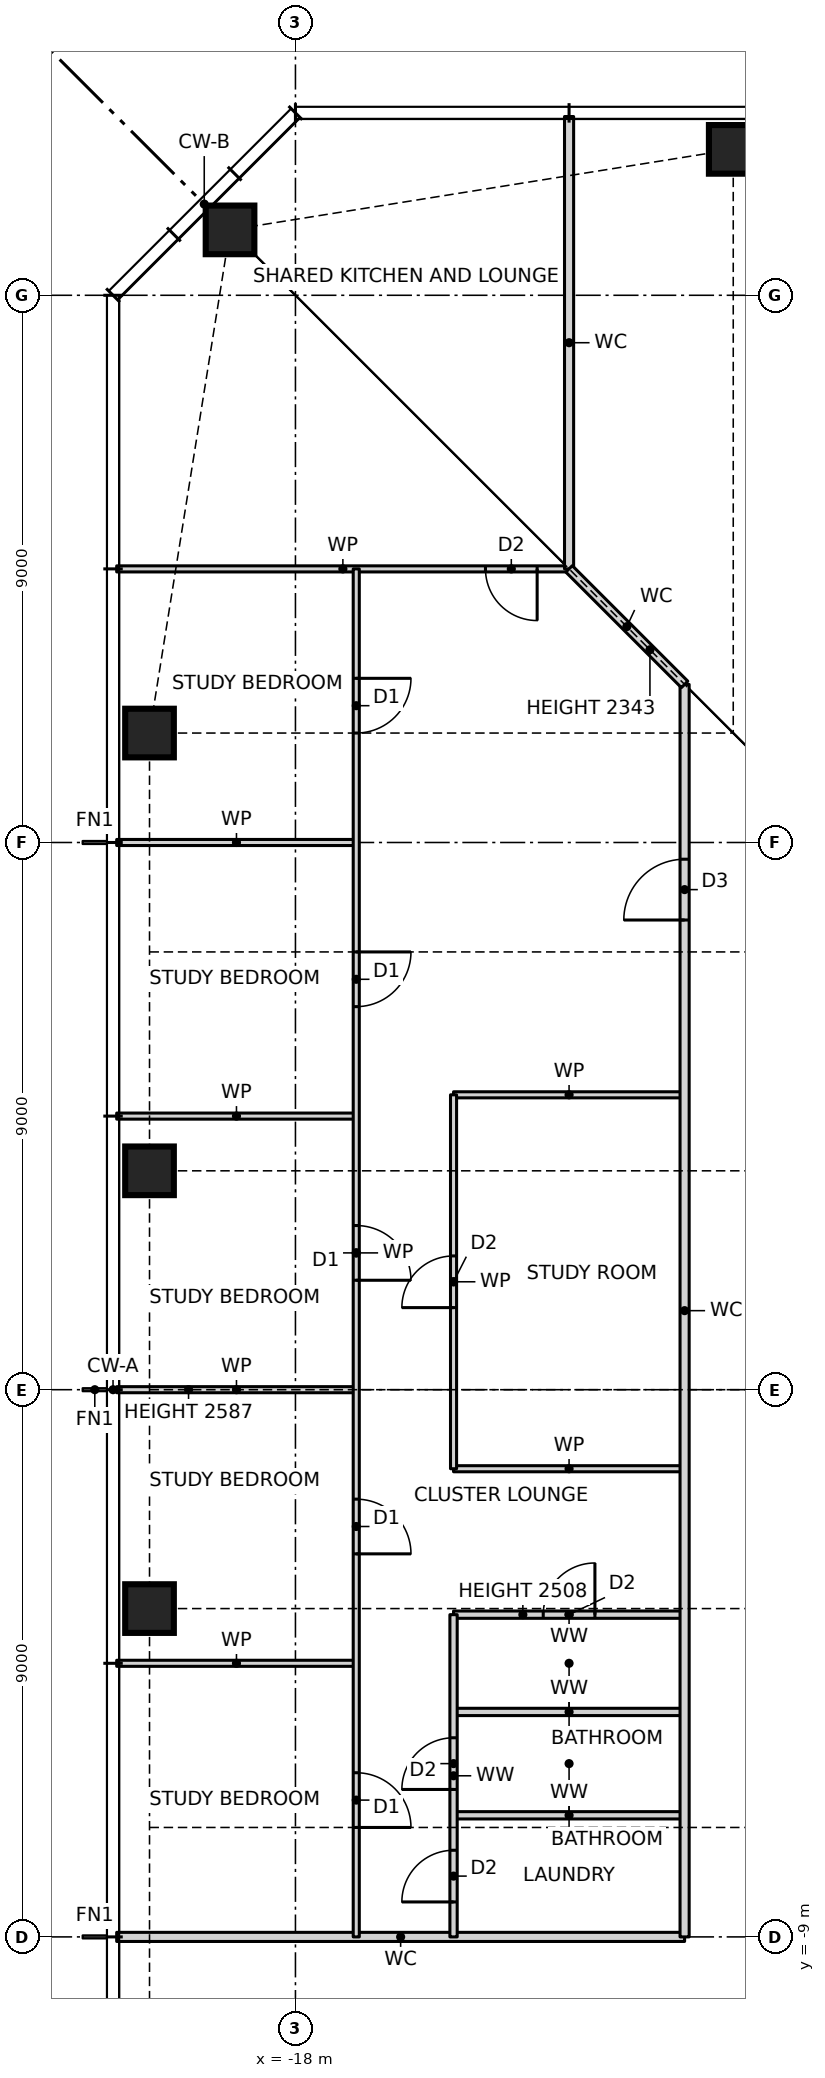
"""IFC4 building model, lengths in metres.
Left out: names, types, materials, properties, quantities, classifications, styles, units other than length and angle.
Written with IfcOpenShell. Run it as: python <this file> out.ifc"""

import sys

from ifc_helpers import new_model, si_unit, direction, frame, frame_2d, origin, origin_2d, place, context, subcontext, project, spatial, rectangle, hollow_rectangle, extrude, element, fill, save


model = new_model("IFC4")
c1 = context("Model", 3, precision=1e-05, world=origin(), true_north=direction((0.0, 1.0)))
c2 = subcontext(c1, "Body", "Model", "MODEL_VIEW")
j1 = project(units=[si_unit("LENGTHUNIT", "METRE"), si_unit("PLANEANGLEUNIT", "RADIAN")], contexts=[c1])
p1 = place(None, origin())
s1 = spatial("IfcSite", under=j1, at=p1, CompositionType="ELEMENT")
p2 = place(p1, origin())
s2 = spatial("IfcBuilding", under=s1, at=p2, CompositionType="ELEMENT")
p3 = place(p2, frame((0.0, 0.0, 98.0)))
s3 = spatial("IfcBuildingStorey", under=s2, at=p3, CompositionType="ELEMENT", Elevation=98.0)
for number, where, z_axis, x_axis in (
    (1, (-10.8, 20.4, 0.0), (0.0, 0.0, 1.0), (1.0, 0.0, 0.0)),
    (2, (-19.076, 19.076, 0.0), (0.0, 0.0, 1.0), (1.0, 0.0, 0.0)),
    (3, (-20.4, 10.8, 0.0), (0.0, 0.0, 1.0), (1.0, 0.0, 0.0)),
    (4, (-20.4, 3.6, 0.0), (0.0, 0.0, 1.0), (1.0, 0.0, 0.0)),
    (5, (-20.4, -3.6, 0.0), (0.0, 0.0, 1.0), (1.0, 0.0, 0.0)),
):
    element("IfcColumn", number, at=place(p3, frame(where, z_axis=z_axis, x_axis=x_axis)), inside=s3, PredefinedType="COLUMN", context=c2, shape_type="SweptSolid", body=[
        extrude(hollow_rectangle(XDim=0.8, YDim=0.8, WallThickness=0.07, at=origin_2d()), origin(), (0.0, 0.0, 1.0), 3.5),
    ])
p4 = place(p3, frame((-20.94, -9.0, 0.0), z_axis=(0.0, 0.0, 1.0), x_axis=(1.0, 0.0, 0.0)))
e6 = element("IfcWall", 6, at=p4, inside=s3, PredefinedType="PARTITIONING", context=c2, shape_type="SweptSolid", body=[
    extrude(rectangle(XDim=9.34, YDim=0.15, at=frame_2d((4.67, 0.0))), origin(), (0.0, 0.0, 1.0), 3.27),
])
for number, where, z_axis, x_axis in (
    (7, (-15.4, -7.0, 0.0), (0.0, 0.0, 1.0), (1.0, 0.0, 0.0)),
    (8, (-15.4, -5.3, 0.0), (0.0, 0.0, 1.0), (1.0, 0.0, 0.0)),
):
    element("IfcWall", number, at=place(p3, frame(where, z_axis=z_axis, x_axis=x_axis)), inside=s3, PredefinedType="PARTITIONING", context=c2, shape_type="SweptSolid", body=[
        extrude(rectangle(XDim=3.8, YDim=0.12, at=frame_2d((1.9, 0.0))), origin(), (0.0, 0.0, 1.0), 3.27),
    ])
p5 = place(p3, frame((-20.94, -4.5, 0.0), z_axis=(0.0, 0.0, 1.0), x_axis=(1.0, 0.0, 0.0)))
e9 = element("IfcWall", 9, at=p5, inside=s3, PredefinedType="PARTITIONING", context=c2, shape_type="SweptSolid", body=[
    extrude(rectangle(XDim=3.94, YDim=0.1, at=frame_2d((1.97, 0.0))), origin(), (0.0, 0.0, 1.0), 3.27),
])
p6 = place(p3, frame((-15.4, -3.7, 0.0), z_axis=(0.0, 0.0, 1.0), x_axis=(1.0, 0.0, 0.0)))
e10 = element("IfcWall", 10, at=p6, inside=s3, PredefinedType="PARTITIONING", context=c2, shape_type="SweptSolid", body=[
    extrude(rectangle(XDim=3.8, YDim=0.12, at=frame_2d((1.9, 0.0))), origin(), (0.0, 0.0, 1.0), 2.508),
])
p7 = place(p6, frame((1.475, 0.0, 0.0)))
e11 = element("IfcOpeningElement", 11, at=p7, cuts=e10, PredefinedType="OPENING", context=c2, shape_type="SweptSolid", body=[
    extrude(rectangle(XDim=0.85, YDim=2.1, at=frame_2d((0.425, 1.05))), frame((0.0, 0.07, 0.0), z_axis=(0.0, -1.0, 0.0), x_axis=(1.0, 0.0, 0.0)), (0.0, 0.0, 1.0), 0.14),
])
p8 = place(p3, frame((-15.4, -1.3, 0.0), z_axis=(0.0, 0.0, 1.0), x_axis=(1.0, 0.0, 0.0)))
e12 = element("IfcWall", 12, at=p8, inside=s3, PredefinedType="PARTITIONING", context=c2, shape_type="SweptSolid", body=[
    extrude(rectangle(XDim=3.8, YDim=0.1, at=frame_2d((1.9, 0.0))), origin(), (0.0, 0.0, 1.0), 3.27),
])
p9 = place(p3, frame((-20.94, 0.0, 0.0), z_axis=(0.0, 0.0, 1.0), x_axis=(1.0, 0.0, 0.0)))
e13 = element("IfcWall", 13, at=p9, inside=s3, PredefinedType="PARTITIONING", context=c2, shape_type="SweptSolid", body=[
    extrude(rectangle(XDim=3.94, YDim=0.1, at=frame_2d((1.97, 0.0))), origin(), (0.0, 0.0, 1.0), 2.587),
])
p10 = place(p3, frame((-20.94, 4.5, 0.0), z_axis=(0.0, 0.0, 1.0), x_axis=(1.0, 0.0, 0.0)))
e14 = element("IfcWall", 14, at=p10, inside=s3, PredefinedType="PARTITIONING", context=c2, shape_type="SweptSolid", body=[
    extrude(rectangle(XDim=3.94, YDim=0.1, at=frame_2d((1.97, 0.0))), origin(), (0.0, 0.0, 1.0), 3.27),
])
p11 = place(p3, frame((-15.4, 4.85, 0.0), z_axis=(0.0, 0.0, 1.0), x_axis=(1.0, 0.0, 0.0)))
e15 = element("IfcWall", 15, at=p11, inside=s3, PredefinedType="PARTITIONING", context=c2, shape_type="SweptSolid", body=[
    extrude(rectangle(XDim=3.8, YDim=0.1, at=frame_2d((1.9, 0.0))), origin(), (0.0, 0.0, 1.0), 3.27),
])
p12 = place(p3, frame((-20.94, 9.0, 0.0), z_axis=(0.0, 0.0, 1.0), x_axis=(1.0, 0.0, 0.0)))
e16 = element("IfcWall", 16, at=p12, inside=s3, PredefinedType="PARTITIONING", context=c2, shape_type="SweptSolid", body=[
    extrude(rectangle(XDim=3.94, YDim=0.1, at=frame_2d((1.97, 0.0))), origin(), (0.0, 0.0, 1.0), 3.27),
])
p13 = place(p3, frame((-20.94, 13.5, 0.0), z_axis=(0.0, 0.0, 1.0), x_axis=(1.0, 0.0, 0.0)))
e17 = element("IfcWall", 17, at=p13, inside=s3, PredefinedType="PARTITIONING", context=c2, shape_type="SweptSolid", body=[
    extrude(rectangle(XDim=7.44, YDim=0.1, at=frame_2d((3.72, 0.0))), origin(), (0.0, 0.0, 1.0), 3.27),
])
p14 = place(p13, frame((6.065, 0.0, 0.0)))
e18 = element("IfcOpeningElement", 18, at=p14, cuts=e17, PredefinedType="OPENING", context=c2, shape_type="SweptSolid", body=[
    extrude(rectangle(XDim=0.85, YDim=2.1, at=frame_2d((0.425, 1.05))), frame((0.0, 0.06, 0.0), z_axis=(0.0, -1.0, 0.0), x_axis=(1.0, 0.0, 0.0)), (0.0, 0.0, 1.0), 0.12),
])
p15 = place(p3, frame((-11.6, -9.0, 0.0), z_axis=(0.0, 0.0, 1.0), x_axis=(0.0, 1.0, 0.0)))
e19 = element("IfcWall", 19, at=p15, inside=s3, PredefinedType="PARTITIONING", context=c2, shape_type="SweptSolid", body=[
    extrude(rectangle(XDim=20.6, YDim=0.15, at=frame_2d((10.3, 0.0))), origin(), (0.0, 0.0, 1.0), 3.27),
])
p16 = place(p15, frame((16.725, 0.0, 0.0)))
e20 = element("IfcOpeningElement", 20, at=p16, cuts=e19, PredefinedType="OPENING", context=c2, shape_type="SweptSolid", body=[
    extrude(rectangle(XDim=1.0, YDim=2.1, at=frame_2d((0.5, 1.05))), frame((0.0, 0.085, 0.0), z_axis=(0.0, -1.0, 0.0), x_axis=(1.0, 0.0, 0.0)), (0.0, 0.0, 1.0), 0.17),
])
p17 = place(p3, frame((-13.5, 13.5, 0.0), z_axis=(0.0, 0.0, 1.0), x_axis=(0.0, 1.0, 0.0)))
e21 = element("IfcWall", 21, at=p17, inside=s3, PredefinedType="PARTITIONING", context=c2, shape_type="SweptSolid", body=[
    extrude(rectangle(XDim=7.44, YDim=0.15, at=frame_2d((3.72, 0.0))), origin(), (0.0, 0.0, 1.0), 3.27),
])
p18 = place(p3, frame((-15.4, -9.0, 0.0), z_axis=(0.0, 0.0, 1.0), x_axis=(0.0, 1.0, 0.0)))
e22 = element("IfcWall", 22, at=p18, inside=s3, PredefinedType="PARTITIONING", context=c2, shape_type="SweptSolid", body=[
    extrude(rectangle(XDim=5.3, YDim=0.12, at=frame_2d((2.65, 0.0))), origin(), (0.0, 0.0, 1.0), 3.27),
])
p19 = place(p18, frame((2.425, 0.0, 0.0)))
e23 = element("IfcOpeningElement", 23, at=p19, cuts=e22, PredefinedType="OPENING", context=c2, shape_type="SweptSolid", body=[
    extrude(rectangle(XDim=0.85, YDim=2.1, at=frame_2d((0.425, 1.05))), frame((0.0, 0.07, 0.0), z_axis=(0.0, -1.0, 0.0), x_axis=(1.0, 0.0, 0.0)), (0.0, 0.0, 1.0), 0.14),
])
p20 = place(p18, frame((0.575, 0.0, 0.0)))
e24 = element("IfcOpeningElement", 24, at=p20, cuts=e22, PredefinedType="OPENING", context=c2, shape_type="SweptSolid", body=[
    extrude(rectangle(XDim=0.85, YDim=2.1, at=frame_2d((0.425, 1.05))), frame((0.0, 0.07, 0.0), z_axis=(0.0, -1.0, 0.0), x_axis=(1.0, 0.0, 0.0)), (0.0, 0.0, 1.0), 0.14),
])
p21 = place(p3, frame((-15.4, -1.3, 0.0), z_axis=(0.0, 0.0, 1.0), x_axis=(0.0, 1.0, 0.0)))
e25 = element("IfcWall", 25, at=p21, inside=s3, PredefinedType="PARTITIONING", context=c2, shape_type="SweptSolid", body=[
    extrude(rectangle(XDim=6.15, YDim=0.1, at=frame_2d((3.075, 0.0))), origin(), (0.0, 0.0, 1.0), 3.27),
])
p22 = place(p21, frame((2.65, 0.0, 0.0)))
e26 = element("IfcOpeningElement", 26, at=p22, cuts=e25, PredefinedType="OPENING", context=c2, shape_type="SweptSolid", body=[
    extrude(rectangle(XDim=0.85, YDim=2.1, at=frame_2d((0.425, 1.05))), frame((0.0, 0.06, 0.0), z_axis=(0.0, -1.0, 0.0), x_axis=(1.0, 0.0, 0.0)), (0.0, 0.0, 1.0), 0.12),
])
p23 = place(p3, frame((-17.0, -9.0, 0.0), z_axis=(0.0, 0.0, 1.0), x_axis=(0.0, 1.0, 0.0)))
e27 = element("IfcWall", 27, at=p23, inside=s3, PredefinedType="PARTITIONING", context=c2, shape_type="SweptSolid", body=[
    extrude(rectangle(XDim=22.5, YDim=0.1, at=frame_2d((11.25, 0.0))), origin(), (0.0, 0.0, 1.0), 3.27),
])
p24 = place(p23, frame((19.8, 0.0, 0.0)))
e28 = element("IfcOpeningElement", 28, at=p24, cuts=e27, PredefinedType="OPENING", context=c2, shape_type="SweptSolid", body=[
    extrude(rectangle(XDim=0.9, YDim=2.1, at=frame_2d((0.45, 1.05))), frame((0.0, 0.06, 0.0), z_axis=(0.0, -1.0, 0.0), x_axis=(1.0, 0.0, 0.0)), (0.0, 0.0, 1.0), 0.12),
])
p25 = place(p23, frame((15.3, 0.0, 0.0)))
e29 = element("IfcOpeningElement", 29, at=p25, cuts=e27, PredefinedType="OPENING", context=c2, shape_type="SweptSolid", body=[
    extrude(rectangle(XDim=0.9, YDim=2.1, at=frame_2d((0.45, 1.05))), frame((0.0, 0.06, 0.0), z_axis=(0.0, -1.0, 0.0), x_axis=(1.0, 0.0, 0.0)), (0.0, 0.0, 1.0), 0.12),
])
p26 = place(p23, frame((10.8, 0.0, 0.0)))
e30 = element("IfcOpeningElement", 30, at=p26, cuts=e27, PredefinedType="OPENING", context=c2, shape_type="SweptSolid", body=[
    extrude(rectangle(XDim=0.9, YDim=2.1, at=frame_2d((0.45, 1.05))), frame((0.0, 0.06, 0.0), z_axis=(0.0, -1.0, 0.0), x_axis=(1.0, 0.0, 0.0)), (0.0, 0.0, 1.0), 0.12),
])
p27 = place(p23, frame((6.3, 0.0, 0.0)))
e31 = element("IfcOpeningElement", 31, at=p27, cuts=e27, PredefinedType="OPENING", context=c2, shape_type="SweptSolid", body=[
    extrude(rectangle(XDim=0.9, YDim=2.1, at=frame_2d((0.45, 1.05))), frame((0.0, 0.06, 0.0), z_axis=(0.0, -1.0, 0.0), x_axis=(1.0, 0.0, 0.0)), (0.0, 0.0, 1.0), 0.12),
])
p28 = place(p23, frame((1.8, 0.0, 0.0)))
e32 = element("IfcOpeningElement", 32, at=p28, cuts=e27, PredefinedType="OPENING", context=c2, shape_type="SweptSolid", body=[
    extrude(rectangle(XDim=0.9, YDim=2.1, at=frame_2d((0.45, 1.05))), frame((0.0, 0.06, 0.0), z_axis=(0.0, -1.0, 0.0), x_axis=(1.0, 0.0, 0.0)), (0.0, 0.0, 1.0), 0.12),
])
p29 = place(p3, frame((-11.6, 11.6, 0.0), z_axis=(0.0, 0.0, 1.0), x_axis=(-0.707106781187, 0.707106781187, 0.0)))
e33 = element("IfcWall", 33, at=p29, inside=s3, PredefinedType="PARTITIONING", context=c2, shape_type="SweptSolid", body=[
    extrude(rectangle(XDim=2.687, YDim=0.15, at=frame_2d((1.343, 0.0))), origin(), (0.0, 0.0, 1.0), 2.343),
])
p30 = place(p24, frame((0.9, 0.0, 0.0), z_axis=(0.0, 0.0, 1.0), x_axis=(-1.0, 0.0, 0.0)))
e34 = element("IfcDoor", 34, at=p30, inside=s3, OperationType="SINGLE_SWING_LEFT", PredefinedType="DOOR", context=c2, shape_type="SweptSolid", body=[
    extrude(rectangle(XDim=0.9, YDim=2.1, at=frame_2d((0.45, 1.05))), frame((0.0, 0.025, 0.0), z_axis=(0.0, -1.0, 0.0), x_axis=(1.0, 0.0, 0.0)), (0.0, 0.0, 1.0), 0.05),
])
fill(e28, e34)
p31 = place(p25, frame((0.9, 0.0, 0.0), z_axis=(0.0, 0.0, 1.0), x_axis=(-1.0, 0.0, 0.0)))
e35 = element("IfcDoor", 35, at=p31, inside=s3, OperationType="SINGLE_SWING_LEFT", PredefinedType="DOOR", context=c2, shape_type="SweptSolid", body=[
    extrude(rectangle(XDim=0.9, YDim=2.1, at=frame_2d((0.45, 1.05))), frame((0.0, 0.025, 0.0), z_axis=(0.0, -1.0, 0.0), x_axis=(1.0, 0.0, 0.0)), (0.0, 0.0, 1.0), 0.05),
])
fill(e29, e35)
p32 = place(p26, frame((0.9, 0.0, 0.0), z_axis=(0.0, 0.0, 1.0), x_axis=(-1.0, 0.0, 0.0)))
e36 = element("IfcDoor", 36, at=p32, inside=s3, OperationType="SINGLE_SWING_RIGHT", PredefinedType="DOOR", context=c2, shape_type="SweptSolid", body=[
    extrude(rectangle(XDim=0.9, YDim=2.1, at=frame_2d((0.45, 1.05))), frame((0.0, 0.025, 0.0), z_axis=(0.0, -1.0, 0.0), x_axis=(1.0, 0.0, 0.0)), (0.0, 0.0, 1.0), 0.05),
])
fill(e30, e36)
p33 = place(p27, frame((0.9, 0.0, 0.0), z_axis=(0.0, 0.0, 1.0), x_axis=(-1.0, 0.0, 0.0)))
e37 = element("IfcDoor", 37, at=p33, inside=s3, OperationType="SINGLE_SWING_RIGHT", PredefinedType="DOOR", context=c2, shape_type="SweptSolid", body=[
    extrude(rectangle(XDim=0.9, YDim=2.1, at=frame_2d((0.45, 1.05))), frame((0.0, 0.025, 0.0), z_axis=(0.0, -1.0, 0.0), x_axis=(1.0, 0.0, 0.0)), (0.0, 0.0, 1.0), 0.05),
])
fill(e31, e37)
p34 = place(p28, frame((0.9, 0.0, 0.0), z_axis=(0.0, 0.0, 1.0), x_axis=(-1.0, 0.0, 0.0)))
e38 = element("IfcDoor", 38, at=p34, inside=s3, OperationType="SINGLE_SWING_RIGHT", PredefinedType="DOOR", context=c2, shape_type="SweptSolid", body=[
    extrude(rectangle(XDim=0.9, YDim=2.1, at=frame_2d((0.45, 1.05))), frame((0.0, 0.025, 0.0), z_axis=(0.0, -1.0, 0.0), x_axis=(1.0, 0.0, 0.0)), (0.0, 0.0, 1.0), 0.05),
])
fill(e32, e38)
p35 = place(p16, origin())
e39 = element("IfcDoor", 39, at=p35, inside=s3, OperationType="SINGLE_SWING_LEFT", PredefinedType="DOOR", context=c2, shape_type="SweptSolid", body=[
    extrude(rectangle(XDim=1.0, YDim=2.1, at=frame_2d((0.5, 1.05))), frame((0.0, 0.025, 0.0), z_axis=(0.0, -1.0, 0.0), x_axis=(1.0, 0.0, 0.0)), (0.0, 0.0, 1.0), 0.05),
])
fill(e20, e39)
p36 = place(p22, origin())
e40 = element("IfcDoor", 40, at=p36, inside=s3, OperationType="SINGLE_SWING_LEFT", PredefinedType="DOOR", context=c2, shape_type="SweptSolid", body=[
    extrude(rectangle(XDim=0.85, YDim=2.1, at=frame_2d((0.425, 1.05))), frame((0.0, 0.025, 0.0), z_axis=(0.0, -1.0, 0.0), x_axis=(1.0, 0.0, 0.0)), (0.0, 0.0, 1.0), 0.05),
])
fill(e26, e40)
p37 = place(p7, origin())
e41 = element("IfcDoor", 41, at=p37, inside=s3, OperationType="SINGLE_SWING_RIGHT", PredefinedType="DOOR", context=c2, shape_type="SweptSolid", body=[
    extrude(rectangle(XDim=0.85, YDim=2.1, at=frame_2d((0.425, 1.05))), frame((0.0, 0.025, 0.0), z_axis=(0.0, -1.0, 0.0), x_axis=(1.0, 0.0, 0.0)), (0.0, 0.0, 1.0), 0.05),
])
fill(e11, e41)
p38 = place(p19, origin())
e42 = element("IfcDoor", 42, at=p38, inside=s3, OperationType="SINGLE_SWING_LEFT", PredefinedType="DOOR", context=c2, shape_type="SweptSolid", body=[
    extrude(rectangle(XDim=0.85, YDim=2.1, at=frame_2d((0.425, 1.05))), frame((0.0, 0.025, 0.0), z_axis=(0.0, -1.0, 0.0), x_axis=(1.0, 0.0, 0.0)), (0.0, 0.0, 1.0), 0.05),
])
fill(e23, e42)
p39 = place(p20, origin())
e43 = element("IfcDoor", 43, at=p39, inside=s3, OperationType="SINGLE_SWING_LEFT", PredefinedType="DOOR", context=c2, shape_type="SweptSolid", body=[
    extrude(rectangle(XDim=0.85, YDim=2.1, at=frame_2d((0.425, 1.05))), frame((0.0, 0.025, 0.0), z_axis=(0.0, -1.0, 0.0), x_axis=(1.0, 0.0, 0.0)), (0.0, 0.0, 1.0), 0.05),
])
fill(e24, e43)
p40 = place(p14, frame((0.85, 0.0, 0.0), z_axis=(0.0, 0.0, 1.0), x_axis=(-1.0, 0.0, 0.0)))
e44 = element("IfcDoor", 44, at=p40, inside=s3, OperationType="SINGLE_SWING_LEFT", PredefinedType="DOOR", context=c2, shape_type="SweptSolid", body=[
    extrude(rectangle(XDim=0.85, YDim=2.1, at=frame_2d((0.425, 1.05))), frame((0.0, 0.025, 0.0), z_axis=(0.0, -1.0, 0.0), x_axis=(1.0, 0.0, 0.0)), (0.0, 0.0, 1.0), 0.05),
])
fill(e18, e44)
save(model, sys.argv[1])
